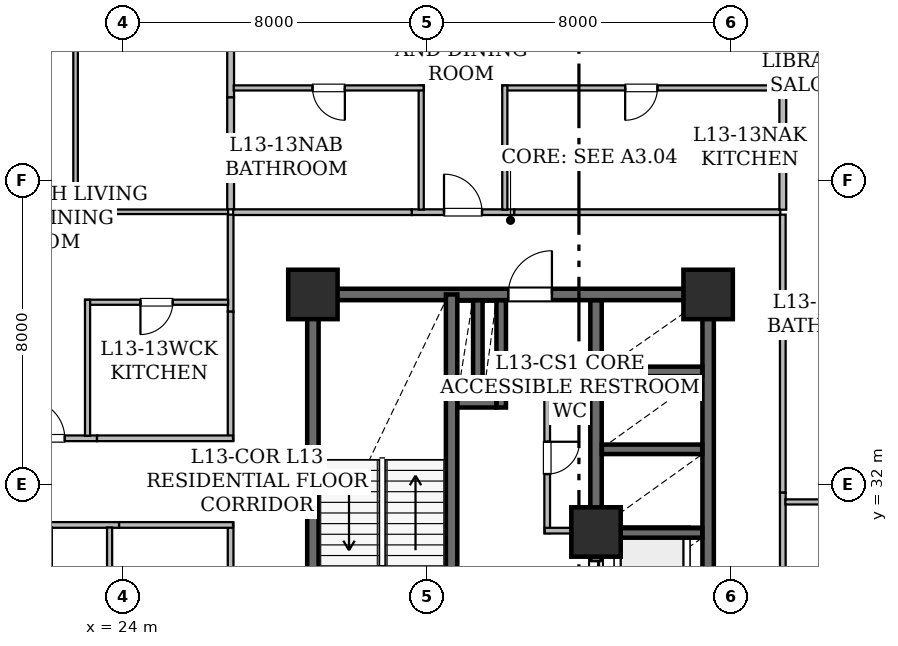
"""IFC4 building model, lengths in metres.
Left out: names, types, materials, properties, quantities, classifications, styles, units other than length and angle.
Written with IfcOpenShell. Run it as: python <this file> out.ifc"""

import sys

from ifc_helpers import new_model, si_unit, direction, frame, frame_2d, origin, origin_2d, place, context, subcontext, project, spatial, rectangle, hollow_rectangle, extrude, element, fill, save


model = new_model("IFC4")
c1 = context("Model", 3, precision=1e-05, world=origin(), true_north=direction((0.0, 1.0)))
c2 = subcontext(c1, "Body", "Model", "MODEL_VIEW")
j1 = project(units=[si_unit("LENGTHUNIT", "METRE"), si_unit("PLANEANGLEUNIT", "RADIAN")], contexts=[c1])
p1 = place(None, origin())
s1 = spatial("IfcSite", under=j1, at=p1, CompositionType="ELEMENT")
p2 = place(p1, origin())
s2 = spatial("IfcBuilding", under=s1, at=p2, CompositionType="ELEMENT")
p3 = place(p2, frame((0.0, 0.0, 55.2)))
s3 = spatial("IfcBuildingStorey", under=s2, at=p3, CompositionType="ELEMENT", Elevation=55.2)
for number, where, z_axis, x_axis in (
    (1, (29.0, 37.0, 0.0), (0.0, 0.0, 1.0), (1.0, 0.0, 0.0)),
    (2, (36.45, 30.75, 0.0), (0.0, 0.0, 1.0), (1.0, 0.0, 0.0)),
    (3, (39.4, 37.0, 0.0), (0.0, 0.0, 1.0), (1.0, 0.0, 0.0)),
):
    element("IfcColumn", number, at=place(p3, frame(where, z_axis=z_axis, x_axis=x_axis)), inside=s3, PredefinedType="COLUMN", context=c2, shape_type="SweptSolid", body=[
        extrude(hollow_rectangle(XDim=1.3, YDim=1.3, WallThickness=0.065, at=origin_2d()), origin(), (0.0, 0.0, 1.0), 3.65),
    ])
p4 = place(p3, frame((29.0, 28.0, 0.0), z_axis=(0.0, 0.0, 1.0), x_axis=(0.0, 1.0, 0.0)))
e4 = element("IfcWall", 4, at=p4, inside=s3, PredefinedType="SHEAR", context=c2, shape_type="SweptSolid", body=[
    extrude(rectangle(XDim=9.0, YDim=0.3, at=frame_2d((4.5, 0.0))), origin(), (0.0, 0.0, 1.0), 3.43),
])
p5 = place(p3, frame((29.0, 37.0, 0.0), z_axis=(0.0, 0.0, 1.0), x_axis=(1.0, 0.0, 0.0)))
e5 = element("IfcWall", 5, at=p5, inside=s3, PredefinedType="SHEAR", context=c2, shape_type="SweptSolid", body=[
    extrude(rectangle(XDim=10.4, YDim=0.3, at=frame_2d((5.2, 0.0))), origin(), (0.0, 0.0, 1.0), 3.43),
])
p6 = place(p5, frame((5.14, 0.0, 0.0)))
e6 = element("IfcOpeningElement", 6, at=p6, cuts=e5, PredefinedType="OPENING", context=c2, shape_type="SweptSolid", body=[
    extrude(rectangle(XDim=1.15, YDim=2.2, at=frame_2d((0.575, 1.1))), frame((0.0, 0.16, 0.0), z_axis=(0.0, -1.0, 0.0), x_axis=(1.0, 0.0, 0.0)), (0.0, 0.0, 1.0), 0.32),
])
p7 = place(p3, frame((39.4, 24.4, 0.0), z_axis=(0.0, 0.0, 1.0), x_axis=(0.0, 1.0, 0.0)))
e7 = element("IfcWall", 7, at=p7, inside=s3, PredefinedType="SHEAR", context=c2, shape_type="SweptSolid", body=[
    extrude(rectangle(XDim=12.6, YDim=0.3, at=frame_2d((6.3, 0.0))), origin(), (0.0, 0.0, 1.0), 3.43),
])
p8 = place(p3, frame((32.65, 28.0, 0.0), z_axis=(0.0, 0.0, 1.0), x_axis=(0.0, 1.0, 0.0)))
e8 = element("IfcWall", 8, at=p8, inside=s3, PredefinedType="SHEAR", context=c2, shape_type="SweptSolid", body=[
    extrude(rectangle(XDim=9.0, YDim=0.3, at=frame_2d((4.5, 0.0))), origin(), (0.0, 0.0, 1.0), 3.43),
])
p9 = place(p8, frame((0.72, 0.0, 0.0)))
e9 = element("IfcOpeningElement", 9, at=p9, cuts=e8, PredefinedType="OPENING", context=c2, shape_type="SweptSolid", body=[
    extrude(rectangle(XDim=1.0, YDim=2.15, at=frame_2d((0.5, 1.075))), frame((0.0, 0.16, 0.0), z_axis=(0.0, -1.0, 0.0), x_axis=(1.0, 0.0, 0.0)), (0.0, 0.0, 1.0), 0.32),
])
p10 = place(p3, frame((36.45, 25.05, 0.0), z_axis=(0.0, 0.0, 1.0), x_axis=(0.0, 1.0, 0.0)))
e10 = element("IfcWall", 10, at=p10, inside=s3, PredefinedType="SHEAR", context=c2, shape_type="SweptSolid", body=[
    extrude(rectangle(XDim=5.05, YDim=0.3, at=frame_2d((2.525, 0.0))), origin(), (0.0, 0.0, 1.0), 3.43),
])
p11 = place(p10, frame((0.12, 0.0, 0.0)))
e11 = element("IfcOpeningElement", 11, at=p11, cuts=e10, PredefinedType="OPENING", context=c2, shape_type="SweptSolid", body=[
    extrude(rectangle(XDim=1.05, YDim=2.15, at=frame_2d((0.525, 1.075))), frame((0.0, 0.16, 0.0), z_axis=(0.0, -1.0, 0.0), x_axis=(1.0, 0.0, 0.0)), (0.0, 0.0, 1.0), 0.32),
])
p12 = place(p10, frame((2.045, 0.0, 0.0)))
e12 = element("IfcOpeningElement", 12, at=p12, cuts=e10, PredefinedType="OPENING", context=c2, shape_type="SweptSolid", body=[
    extrude(rectangle(XDim=1.05, YDim=2.15, at=frame_2d((0.525, 1.075))), frame((0.0, 0.16, 0.0), z_axis=(0.0, -1.0, 0.0), x_axis=(1.0, 0.0, 0.0)), (0.0, 0.0, 1.0), 0.32),
])
p13 = place(p10, frame((3.88, 0.0, 0.0)))
e13 = element("IfcOpeningElement", 13, at=p13, cuts=e10, PredefinedType="OPENING", context=c2, shape_type="SweptSolid", body=[
    extrude(rectangle(XDim=1.05, YDim=2.15, at=frame_2d((0.525, 1.075))), frame((0.0, 0.16, 0.0), z_axis=(0.0, -1.0, 0.0), x_axis=(1.0, 0.0, 0.0)), (0.0, 0.0, 1.0), 0.32),
])
p14 = place(p3, frame((36.45, 31.4, 0.0), z_axis=(0.0, 0.0, 1.0), x_axis=(0.0, 1.0, 0.0)))
e14 = element("IfcWall", 14, at=p14, inside=s3, PredefinedType="SHEAR", context=c2, shape_type="SweptSolid", body=[
    extrude(rectangle(XDim=5.446, YDim=0.3, at=frame_2d((2.723, 0.0))), origin(), (0.0, 0.0, 1.0), 3.43),
])
for number, where, z_axis, x_axis in (
    (15, (36.604, 30.725, 0.0), (0.0, 0.0, 1.0), (1.0, 0.0, 0.0)),
    (16, (36.604, 32.925, 0.0), (0.0, 0.0, 1.0), (1.0, 0.0, 0.0)),
    (17, (36.604, 34.975, 0.0), (0.0, 0.0, 1.0), (1.0, 0.0, 0.0)),
):
    element("IfcWall", number, at=place(p3, frame(where, z_axis=z_axis, x_axis=x_axis)), inside=s3, PredefinedType="SHEAR", context=c2, shape_type="SweptSolid", body=[
        extrude(rectangle(XDim=2.642, YDim=0.25, at=frame_2d((1.321, 0.0))), origin(), (0.0, 0.0, 1.0), 3.43),
    ])
p15 = place(p3, frame((33.955, 34.025, 0.0), z_axis=(0.0, 0.0, 1.0), x_axis=(0.0, 1.0, 0.0)))
e18 = element("IfcWall", 18, at=p15, inside=s3, PredefinedType="SHEAR", context=c2, shape_type="SweptSolid", body=[
    extrude(rectangle(XDim=2.821, YDim=0.25, at=frame_2d((1.411, 0.0))), origin(), (0.0, 0.0, 1.0), 3.43),
])
p16 = place(p3, frame((32.804, 34.15, 0.0), z_axis=(0.0, 0.0, 1.0), x_axis=(1.0, 0.0, 0.0)))
e19 = element("IfcWall", 19, at=p16, inside=s3, PredefinedType="SHEAR", context=c2, shape_type="SweptSolid", body=[
    extrude(rectangle(XDim=1.022, YDim=0.25, at=frame_2d((0.511, 0.0))), origin(), (0.0, 0.0, 1.0), 3.43),
])
p17 = place(p3, frame((33.34, 34.279, 0.0), z_axis=(0.0, 0.0, 1.0), x_axis=(0.0, 1.0, 0.0)))
e20 = element("IfcWall", 20, at=p17, inside=s3, PredefinedType="SHEAR", context=c2, shape_type="SweptSolid", body=[
    extrude(rectangle(XDim=2.567, YDim=0.25, at=frame_2d((1.283, 0.0))), origin(), (0.0, 0.0, 1.0), 3.43),
])
p18 = place(p3, frame((36.306, 34.615, 0.0), z_axis=(0.0, 0.0, 1.0), x_axis=(-1.0, 0.0, 0.0)))
e21 = element("IfcWall", 21, at=p18, inside=s3, PredefinedType="STANDARD", context=c2, shape_type="SweptSolid", body=[
    extrude(rectangle(XDim=1.206, YDim=0.15, at=frame_2d((0.603, 0.0))), origin(), (0.0, 0.0, 1.0), 3.43),
])
p19 = place(p3, frame((35.165, 34.678, 0.0), z_axis=(0.0, 0.0, 1.0), x_axis=(0.0, -1.0, 0.0)))
e22 = element("IfcWall", 22, at=p19, inside=s3, PredefinedType="STANDARD", context=c2, shape_type="SweptSolid", body=[
    extrude(rectangle(XDim=3.958, YDim=0.15, at=frame_2d((1.979, 0.0))), origin(), (0.0, 0.0, 1.0), 3.43),
])
p20 = place(p19, frame((1.554, 0.0, 0.0)))
e23 = element("IfcOpeningElement", 23, at=p20, cuts=e22, PredefinedType="OPENING", context=c2, shape_type="SweptSolid", body=[
    extrude(rectangle(XDim=0.85, YDim=2.1, at=frame_2d((0.425, 1.05))), frame((0.0, 0.085, 0.0), z_axis=(0.0, -1.0, 0.0), x_axis=(1.0, 0.0, 0.0)), (0.0, 0.0, 1.0), 0.17),
])
p21 = place(p3, frame((35.102, 30.785, 0.0), z_axis=(0.0, 0.0, 1.0), x_axis=(1.0, 0.0, 0.0)))
e24 = element("IfcWall", 24, at=p21, inside=s3, PredefinedType="STANDARD", context=c2, shape_type="SweptSolid", body=[
    extrude(rectangle(XDim=1.198, YDim=0.15, at=frame_2d((0.599, 0.0))), origin(), (0.0, 0.0, 1.0), 3.43),
])
p22 = place(p3, frame((23.9, 30.935, 0.0), z_axis=(0.0, 0.0, 1.0), x_axis=(-1.0, 0.0, 0.0)))
e25 = element("IfcWall", 25, at=p22, inside=s3, PredefinedType="STANDARD", context=c2, shape_type="SweptSolid", body=[
    extrude(rectangle(XDim=2.079, YDim=0.15, at=frame_2d((1.04, 0.0))), origin(), (0.0, 0.0, 1.0), 3.43),
])
p23 = place(p3, frame((26.835, 23.983, 0.0), z_axis=(0.0, 0.0, 1.0), x_axis=(0.0, 1.0, 0.0)))
e26 = element("IfcWall", 26, at=p23, inside=s3, PredefinedType="STANDARD", context=c2, shape_type="SweptSolid", body=[
    extrude(rectangle(XDim=7.017, YDim=0.15, at=frame_2d((3.509, 0.0))), origin(), (0.0, 0.0, 1.0), 2.957),
])
p24 = place(p3, frame((26.898, 30.935, 0.0), z_axis=(0.0, 0.0, 1.0), x_axis=(-1.0, 0.0, 0.0)))
e27 = element("IfcWall", 27, at=p24, inside=s3, PredefinedType="STANDARD", context=c2, shape_type="SweptSolid", body=[
    extrude(rectangle(XDim=2.998, YDim=0.15, at=frame_2d((1.499, 0.0))), origin(), (0.0, 0.0, 1.0), 3.43),
])
p25 = place(p3, frame((26.835, 36.546, 0.0), z_axis=(0.0, 0.0, 1.0), x_axis=(0.0, 1.0, 0.0)))
e28 = element("IfcWall", 28, at=p25, inside=s3, PredefinedType="STANDARD", context=c2, shape_type="SweptSolid", body=[
    extrude(rectangle(XDim=2.554, YDim=0.15, at=frame_2d((1.277, 0.0))), origin(), (0.0, 0.0, 1.0), 2.647),
])
p26 = place(p3, frame((20.621, 33.215, 0.0), z_axis=(0.0, 0.0, 1.0), x_axis=(1.0, 0.0, 0.0)))
e29 = element("IfcWall", 29, at=p26, inside=s3, PredefinedType="STANDARD", context=c2, shape_type="SweptSolid", body=[
    extrude(rectangle(XDim=2.698, YDim=0.15, at=frame_2d((1.349, 0.0))), origin(), (0.0, 0.0, 1.0), 3.43),
])
p27 = place(p26, frame((0.849, 0.0, 0.0)))
e30 = element("IfcOpeningElement", 30, at=p27, cuts=e29, PredefinedType="OPENING", context=c2, shape_type="SweptSolid", body=[
    extrude(rectangle(XDim=1.0, YDim=2.15, at=frame_2d((0.5, 1.075))), frame((0.0, 0.085, 0.0), z_axis=(0.0, -1.0, 0.0), x_axis=(1.0, 0.0, 0.0)), (0.0, 0.0, 1.0), 0.17),
])
p28 = place(p3, frame((26.835, 33.15, 0.0), z_axis=(0.0, 0.0, 1.0), x_axis=(0.0, 1.0, 0.0)))
e31 = element("IfcWall", 31, at=p28, inside=s3, PredefinedType="STANDARD", context=c2, shape_type="SweptSolid", body=[
    extrude(rectangle(XDim=3.396, YDim=0.15, at=frame_2d((1.698, 0.0))), origin(), (0.0, 0.0, 1.0), 3.43),
])
p29 = place(p3, frame((23.319, 33.215, 0.0), z_axis=(0.0, 0.0, 1.0), x_axis=(1.0, 0.0, 0.0)))
e32 = element("IfcWall", 32, at=p29, inside=s3, PredefinedType="STANDARD", context=c2, shape_type="SweptSolid", body=[
    extrude(rectangle(XDim=3.579, YDim=0.15, at=frame_2d((1.79, 0.0))), origin(), (0.0, 0.0, 1.0), 3.43),
])
p30 = place(p3, frame((31.601, 39.165, 0.0), z_axis=(0.0, 0.0, 1.0), x_axis=(1.0, 0.0, 0.0)))
e33 = element("IfcWall", 33, at=p30, inside=s3, PredefinedType="STANDARD", context=c2, shape_type="SweptSolid", body=[
    extrude(rectangle(XDim=2.698, YDim=0.15, at=frame_2d((1.349, 0.0))), origin(), (0.0, 0.0, 1.0), 3.43),
])
p31 = place(p30, frame((0.849, 0.0, 0.0)))
e34 = element("IfcOpeningElement", 34, at=p31, cuts=e33, PredefinedType="OPENING", context=c2, shape_type="SweptSolid", body=[
    extrude(rectangle(XDim=1.0, YDim=2.15, at=frame_2d((0.5, 1.075))), frame((0.0, 0.085, 0.0), z_axis=(0.0, -1.0, 0.0), x_axis=(1.0, 0.0, 0.0)), (0.0, 0.0, 1.0), 0.17),
])
p32 = place(p3, frame((26.9, 39.165, 0.0), z_axis=(0.0, 0.0, 1.0), x_axis=(1.0, 0.0, 0.0)))
e35 = element("IfcWall", 35, at=p32, inside=s3, PredefinedType="STANDARD", context=c2, shape_type="SweptSolid", body=[
    extrude(rectangle(XDim=4.701, YDim=0.15, at=frame_2d((2.351, 0.0))), origin(), (0.0, 0.0, 1.0), 2.647),
])
p33 = place(p3, frame((34.299, 39.165, 0.0), z_axis=(0.0, 0.0, 1.0), x_axis=(1.0, 0.0, 0.0)))
e36 = element("IfcWall", 36, at=p33, inside=s3, PredefinedType="STANDARD", context=c2, shape_type="SweptSolid", body=[
    extrude(rectangle(XDim=7.001, YDim=0.15, at=frame_2d((3.5, 0.0))), origin(), (0.0, 0.0, 1.0), 3.43),
])
p34 = place(p3, frame((41.365, 39.1, 0.0), z_axis=(0.0, 0.0, 1.0), x_axis=(0.0, -1.0, 0.0)))
e37 = element("IfcWall", 37, at=p34, inside=s3, PredefinedType="STANDARD", context=c2, shape_type="SweptSolid", body=[
    extrude(rectangle(XDim=2.843, YDim=0.15, at=frame_2d((1.421, 0.0))), origin(), (0.0, 0.0, 1.0), 2.647),
])
p35 = place(p3, frame((41.365, 31.79, 0.0), z_axis=(0.0, 0.0, 1.0), x_axis=(0.0, -1.0, 0.0)))
e38 = element("IfcWall", 38, at=p35, inside=s3, PredefinedType="STANDARD", context=c2, shape_type="SweptSolid", body=[
    extrude(rectangle(XDim=2.698, YDim=0.15, at=frame_2d((1.349, 0.0))), origin(), (0.0, 0.0, 1.0), 3.43),
])
p36 = place(p3, frame((41.365, 36.257, 0.0), z_axis=(0.0, 0.0, 1.0), x_axis=(0.0, -1.0, 0.0)))
e39 = element("IfcWall", 39, at=p36, inside=s3, PredefinedType="STANDARD", context=c2, shape_type="SweptSolid", body=[
    extrude(rectangle(XDim=4.467, YDim=0.15, at=frame_2d((2.233, 0.0))), origin(), (0.0, 0.0, 1.0), 3.43),
])
p37 = place(p3, frame((23.65, 30.868, 0.0), z_axis=(0.0, 0.0, 1.0), x_axis=(0.0, -1.0, 0.0)))
e40 = element("IfcWall", 40, at=p37, inside=s3, PredefinedType="PARTITIONING", context=c2, shape_type="SweptSolid", body=[
    extrude(rectangle(XDim=7.199, YDim=0.135, at=frame_2d((3.6, 0.0))), origin(), (0.0, 0.0, 1.0), 2.957),
])
p38 = place(p37, frame((3.175, 0.0, 0.0)))
e41 = element("IfcOpeningElement", 41, at=p38, cuts=e40, PredefinedType="OPENING", context=c2, shape_type="SweptSolid", body=[
    extrude(rectangle(XDim=0.85, YDim=2.1, at=frame_2d((0.425, 1.05))), frame((0.0, 0.077, 0.0), z_axis=(0.0, -1.0, 0.0), x_axis=(1.0, 0.0, 0.0)), (0.0, 0.0, 1.0), 0.155),
])
p39 = place(p3, frame((26.77, 36.795, 0.0), z_axis=(0.0, 0.0, 1.0), x_axis=(-1.0, 0.0, 0.0)))
e42 = element("IfcWall", 42, at=p39, inside=s3, PredefinedType="PARTITIONING", context=c2, shape_type="SweptSolid", body=[
    extrude(rectangle(XDim=3.765, YDim=0.135, at=frame_2d((1.883, 0.0))), origin(), (0.0, 0.0, 1.0), 3.43),
])
p40 = place(p39, frame((1.458, 0.0, 0.0)))
e43 = element("IfcOpeningElement", 43, at=p40, cuts=e42, PredefinedType="OPENING", context=c2, shape_type="SweptSolid", body=[
    extrude(rectangle(XDim=0.85, YDim=2.1, at=frame_2d((0.425, 1.05))), frame((0.0, 0.077, 0.0), z_axis=(0.0, -1.0, 0.0), x_axis=(1.0, 0.0, 0.0)), (0.0, 0.0, 1.0), 0.155),
])
p41 = place(p3, frame((23.07, 36.86, 0.0), z_axis=(0.0, 0.0, 1.0), x_axis=(0.0, -1.0, 0.0)))
e44 = element("IfcWall", 44, at=p41, inside=s3, PredefinedType="PARTITIONING", context=c2, shape_type="SweptSolid", body=[
    extrude(rectangle(XDim=3.578, YDim=0.135, at=frame_2d((1.789, 0.0))), origin(), (0.0, 0.0, 1.0), 3.43),
])
p42 = place(p3, frame((22.755, 52.788, 0.0), z_axis=(0.0, 0.0, 1.0), x_axis=(0.0, -1.0, 0.0)))
e45 = element("IfcWall", 45, at=p42, inside=s3, PredefinedType="PARTITIONING", context=c2, shape_type="SweptSolid", body=[
    extrude(rectangle(XDim=13.678, YDim=0.12, at=frame_2d((6.839, 0.0))), origin(), (0.0, 0.0, 1.0), 2.803),
])
p43 = place(p42, frame((6.389, 0.0, 0.0)))
e46 = element("IfcOpeningElement", 46, at=p43, cuts=e45, PredefinedType="OPENING", context=c2, shape_type="SweptSolid", body=[
    extrude(rectangle(XDim=0.9, YDim=2.1, at=frame_2d((0.45, 1.05))), frame((0.0, 0.07, 0.0), z_axis=(0.0, -1.0, 0.0), x_axis=(1.0, 0.0, 0.0)), (0.0, 0.0, 1.0), 0.14),
])
p44 = place(p3, frame((22.69, 39.175, 0.0), z_axis=(0.0, 0.0, 1.0), x_axis=(1.0, 0.0, 0.0)))
e47 = element("IfcWall", 47, at=p44, inside=s3, PredefinedType="PARTITIONING", context=c2, shape_type="SweptSolid", body=[
    extrude(rectangle(XDim=4.08, YDim=0.12, at=frame_2d((2.04, 0.0))), origin(), (0.0, 0.0, 1.0), 3.43),
])
p45 = place(p3, frame((26.835, 45.063, 0.0), z_axis=(0.0, 0.0, 1.0), x_axis=(0.0, -1.0, 0.0)))
e48 = element("IfcWall", 48, at=p45, inside=s3, PredefinedType="STANDARD", context=c2, shape_type="SweptSolid", body=[
    extrude(rectangle(XDim=2.878, YDim=0.18, at=frame_2d((1.439, 0.0))), origin(), (0.0, 0.0, 1.0), 2.957),
])
p46 = place(p3, frame((26.835, 42.185, 0.0), z_axis=(0.0, 0.0, 1.0), x_axis=(0.0, -1.0, 0.0)))
e49 = element("IfcWall", 49, at=p46, inside=s3, PredefinedType="STANDARD", context=c2, shape_type="SweptSolid", body=[
    extrude(rectangle(XDim=2.945, YDim=0.18, at=frame_2d((1.473, 0.0))), origin(), (0.0, 0.0, 1.0), 3.43),
])
p47 = place(p3, frame((31.85, 39.232, 0.0), z_axis=(0.0, 0.0, 1.0), x_axis=(0.0, 1.0, 0.0)))
e50 = element("IfcWall", 50, at=p47, inside=s3, PredefinedType="PARTITIONING", context=c2, shape_type="SweptSolid", body=[
    extrude(rectangle(XDim=3.267, YDim=0.135, at=frame_2d((1.634, 0.0))), origin(), (0.0, 0.0, 1.0), 3.43),
])
p48 = place(p3, frame((31.915, 42.434, 0.0), z_axis=(0.0, 0.0, 1.0), x_axis=(-1.0, 0.0, 0.0)))
e51 = element("IfcWall", 51, at=p48, inside=s3, PredefinedType="PARTITIONING", context=c2, shape_type="SweptSolid", body=[
    extrude(rectangle(XDim=4.998, YDim=0.135, at=frame_2d((2.499, 0.0))), origin(), (0.0, 0.0, 1.0), 2.647),
])
p49 = place(p48, frame((2.074, 0.0, 0.0)))
e52 = element("IfcOpeningElement", 52, at=p49, cuts=e51, PredefinedType="OPENING", context=c2, shape_type="SweptSolid", body=[
    extrude(rectangle(XDim=0.85, YDim=2.1, at=frame_2d((0.425, 1.05))), frame((0.0, 0.077, 0.0), z_axis=(0.0, -1.0, 0.0), x_axis=(1.0, 0.0, 0.0)), (0.0, 0.0, 1.0), 0.155),
])
p50 = place(p3, frame((41.3, 42.434, 0.0), z_axis=(0.0, 0.0, 1.0), x_axis=(-1.0, 0.0, 0.0)))
e53 = element("IfcWall", 53, at=p50, inside=s3, PredefinedType="PARTITIONING", context=c2, shape_type="SweptSolid", body=[
    extrude(rectangle(XDim=7.315, YDim=0.135, at=frame_2d((3.657, 0.0))), origin(), (0.0, 0.0, 1.0), 2.957),
])
p51 = place(p50, frame((3.233, 0.0, 0.0)))
e54 = element("IfcOpeningElement", 54, at=p51, cuts=e53, PredefinedType="OPENING", context=c2, shape_type="SweptSolid", body=[
    extrude(rectangle(XDim=0.85, YDim=2.1, at=frame_2d((0.425, 1.05))), frame((0.0, 0.077, 0.0), z_axis=(0.0, -1.0, 0.0), x_axis=(1.0, 0.0, 0.0)), (0.0, 0.0, 1.0), 0.155),
])
p52 = place(p3, frame((34.05, 42.499, 0.0), z_axis=(0.0, 0.0, 1.0), x_axis=(0.0, -1.0, 0.0)))
e55 = element("IfcWall", 55, at=p52, inside=s3, PredefinedType="PARTITIONING", context=c2, shape_type="SweptSolid", body=[
    extrude(rectangle(XDim=3.267, YDim=0.135, at=frame_2d((1.634, 0.0))), origin(), (0.0, 0.0, 1.0), 3.43),
])
p53 = place(p3, frame((41.365, 44.749, 0.0), z_axis=(0.0, 0.0, 1.0), x_axis=(0.0, -1.0, 0.0)))
e56 = element("IfcWall", 56, at=p53, inside=s3, PredefinedType="STANDARD", context=c2, shape_type="SweptSolid", body=[
    extrude(rectangle(XDim=2.25, YDim=0.18, at=frame_2d((1.125, 0.0))), origin(), (0.0, 0.0, 1.0), 2.957),
])
p54 = place(p3, frame((41.365, 42.369, 0.0), z_axis=(0.0, 0.0, 1.0), x_axis=(0.0, -1.0, 0.0)))
e57 = element("IfcWall", 57, at=p54, inside=s3, PredefinedType="STANDARD", context=c2, shape_type="SweptSolid", body=[
    extrude(rectangle(XDim=3.139, YDim=0.18, at=frame_2d((1.569, 0.0))), origin(), (0.0, 0.0, 1.0), 3.43),
])
p55 = place(p3, frame((43.83, 36.506, 0.0), z_axis=(0.0, 0.0, 1.0), x_axis=(-1.0, 0.0, 0.0)))
e58 = element("IfcWall", 58, at=p55, inside=s3, PredefinedType="PARTITIONING", context=c2, shape_type="SweptSolid", body=[
    extrude(rectangle(XDim=2.398, YDim=0.135, at=frame_2d((1.199, 0.0))), origin(), (0.0, 0.0, 1.0), 2.647),
])
p56 = place(p3, frame((41.432, 31.541, 0.0), z_axis=(0.0, 0.0, 1.0), x_axis=(1.0, 0.0, 0.0)))
e59 = element("IfcWall", 59, at=p56, inside=s3, PredefinedType="PARTITIONING", context=c2, shape_type="SweptSolid", body=[
    extrude(rectangle(XDim=2.528, YDim=0.135, at=frame_2d((1.264, 0.0))), origin(), (0.0, 0.0, 1.0), 2.647),
])
p57 = place(p6, origin())
e60 = element("IfcDoor", 60, at=p57, inside=s3, OperationType="SINGLE_SWING_RIGHT", PredefinedType="DOOR", context=c2, shape_type="SweptSolid", body=[
    extrude(rectangle(XDim=1.15, YDim=2.2, at=frame_2d((0.575, 1.1))), frame((0.0, 0.025, 0.0), z_axis=(0.0, -1.0, 0.0), x_axis=(1.0, 0.0, 0.0)), (0.0, 0.0, 1.0), 0.05),
])
fill(e6, e60)
p58 = place(p13, origin())
e61 = element("IfcDoor", 61, at=p58, inside=s3, OperationType="SLIDING_TO_LEFT", PredefinedType="DOOR", context=c2, shape_type="SweptSolid", body=[
    extrude(rectangle(XDim=1.05, YDim=2.15, at=frame_2d((0.525, 1.075))), frame((0.0, 0.025, 0.0), z_axis=(0.0, -1.0, 0.0), x_axis=(1.0, 0.0, 0.0)), (0.0, 0.0, 1.0), 0.05),
])
fill(e13, e61)
p59 = place(p20, origin())
e62 = element("IfcDoor", 62, at=p59, inside=s3, OperationType="SINGLE_SWING_LEFT", PredefinedType="DOOR", context=c2, shape_type="SweptSolid", body=[
    extrude(rectangle(XDim=0.85, YDim=2.1, at=frame_2d((0.425, 1.05))), frame((0.0, 0.025, 0.0), z_axis=(0.0, -1.0, 0.0), x_axis=(1.0, 0.0, 0.0)), (0.0, 0.0, 1.0), 0.05),
])
fill(e23, e62)
p60 = place(p27, origin())
e63 = element("IfcDoor", 63, at=p60, inside=s3, OperationType="SINGLE_SWING_LEFT", PredefinedType="DOOR", context=c2, shape_type="SweptSolid", body=[
    extrude(rectangle(XDim=1.0, YDim=2.15, at=frame_2d((0.5, 1.075))), frame((0.0, 0.025, 0.0), z_axis=(0.0, -1.0, 0.0), x_axis=(1.0, 0.0, 0.0)), (0.0, 0.0, 1.0), 0.05),
])
fill(e30, e63)
p61 = place(p31, origin())
e64 = element("IfcDoor", 64, at=p61, inside=s3, OperationType="SINGLE_SWING_LEFT", PredefinedType="DOOR", context=c2, shape_type="SweptSolid", body=[
    extrude(rectangle(XDim=1.0, YDim=2.15, at=frame_2d((0.5, 1.075))), frame((0.0, 0.025, 0.0), z_axis=(0.0, -1.0, 0.0), x_axis=(1.0, 0.0, 0.0)), (0.0, 0.0, 1.0), 0.05),
])
fill(e34, e64)
p62 = place(p40, origin())
e65 = element("IfcDoor", 65, at=p62, inside=s3, OperationType="SINGLE_SWING_RIGHT", PredefinedType="DOOR", context=c2, shape_type="SweptSolid", body=[
    extrude(rectangle(XDim=0.85, YDim=2.1, at=frame_2d((0.425, 1.05))), frame((0.0, 0.025, 0.0), z_axis=(0.0, -1.0, 0.0), x_axis=(1.0, 0.0, 0.0)), (0.0, 0.0, 1.0), 0.05),
])
fill(e43, e65)
p63 = place(p49, origin())
e66 = element("IfcDoor", 66, at=p63, inside=s3, OperationType="SINGLE_SWING_LEFT", PredefinedType="DOOR", context=c2, shape_type="SweptSolid", body=[
    extrude(rectangle(XDim=0.85, YDim=2.1, at=frame_2d((0.425, 1.05))), frame((0.0, 0.025, 0.0), z_axis=(0.0, -1.0, 0.0), x_axis=(1.0, 0.0, 0.0)), (0.0, 0.0, 1.0), 0.05),
])
fill(e52, e66)
p64 = place(p51, origin())
e67 = element("IfcDoor", 67, at=p64, inside=s3, OperationType="SINGLE_SWING_RIGHT", PredefinedType="DOOR", context=c2, shape_type="SweptSolid", body=[
    extrude(rectangle(XDim=0.85, YDim=2.1, at=frame_2d((0.425, 1.05))), frame((0.0, 0.025, 0.0), z_axis=(0.0, -1.0, 0.0), x_axis=(1.0, 0.0, 0.0)), (0.0, 0.0, 1.0), 0.05),
])
fill(e54, e67)
save(model, sys.argv[1])
